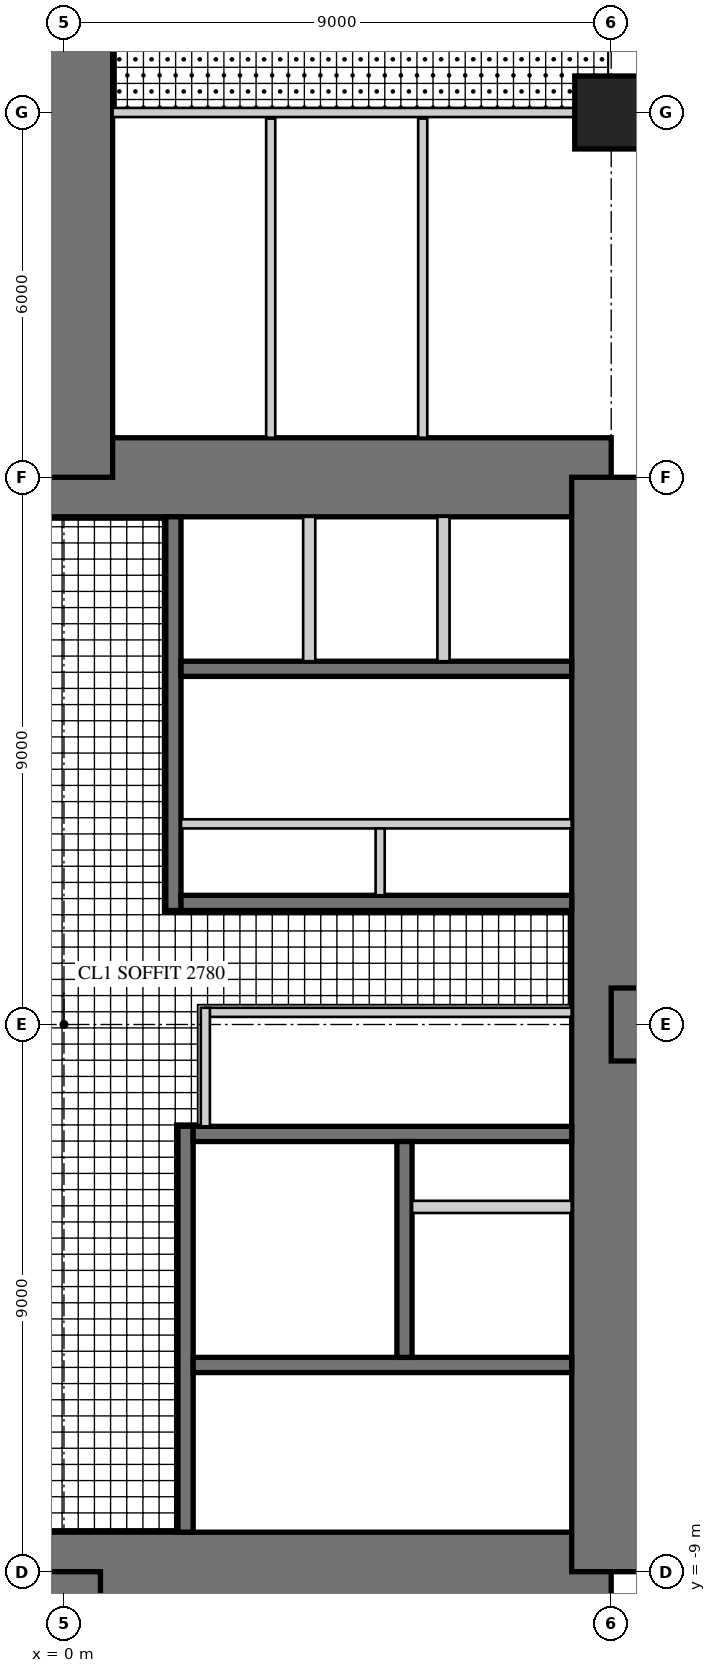
"""IFC4 building model, lengths in metres.
Left out: names, types, materials, properties, quantities, classifications, styles, units other than length and angle.
Written with IfcOpenShell. Run it as: python <this file> out.ifc"""

import sys

from ifc_helpers import new_model, si_unit, direction, frame, frame_2d, origin, origin_2d, place, context, subcontext, project, spatial, rectangle, extrude, element, fill, save


model = new_model("IFC4")
c1 = context("Model", 3, precision=1e-05, world=origin(), true_north=direction((0.0, 1.0)))
c2 = subcontext(c1, "Body", "Model", "MODEL_VIEW")
j1 = project(units=[si_unit("LENGTHUNIT", "METRE"), si_unit("PLANEANGLEUNIT", "RADIAN")], contexts=[c1])
p1 = place(None, origin())
s1 = spatial("IfcSite", under=j1, at=p1, CompositionType="ELEMENT")
p2 = place(p1, origin())
s2 = spatial("IfcBuilding", under=s1, at=p2, CompositionType="ELEMENT")
p3 = place(p2, frame((0.0, 0.0, 79.5)))
s3 = spatial("IfcBuildingStorey", under=s2, at=p3, CompositionType="ELEMENT", Elevation=79.5)
p4 = place(p3, frame((9.0, 9.0, 0.0), z_axis=(0.0, 0.0, 1.0), x_axis=(-1.0, 0.0, 0.0)))
e1 = element("IfcWall", 1, at=p4, inside=s3, PredefinedType="SHEAR", context=c2, shape_type="SweptSolid", body=[
    extrude(rectangle(XDim=18.0, YDim=1.3, at=frame_2d((9.0, 0.0))), origin(), (0.0, 0.0, 1.0), 4.0),
])
p5 = place(p4, frame((9.8, 0.0, 0.0)))
e2 = element("IfcOpeningElement", 2, at=p5, cuts=e1, PredefinedType="OPENING", context=c2, shape_type="SweptSolid", body=[
    extrude(rectangle(XDim=1.0, YDim=2.4, at=frame_2d((0.5, 1.2))), frame((0.0, 0.66, 0.0), z_axis=(0.0, -1.0, 0.0), x_axis=(1.0, 0.0, 0.0)), (0.0, 0.0, 1.0), 1.32),
])
p6 = place(p3, frame((-9.0, -9.0, 0.0), z_axis=(0.0, 0.0, 1.0), x_axis=(1.0, 0.0, 0.0)))
e3 = element("IfcWall", 3, at=p6, inside=s3, PredefinedType="SHEAR", context=c2, shape_type="SweptSolid", body=[
    extrude(rectangle(XDim=18.0, YDim=1.3, at=frame_2d((9.0, 0.0))), origin(), (0.0, 0.0, 1.0), 4.0),
])
p7 = place(p6, frame((9.8, 0.0, 0.0)))
e4 = element("IfcOpeningElement", 4, at=p7, cuts=e3, PredefinedType="OPENING", context=c2, shape_type="SweptSolid", body=[
    extrude(rectangle(XDim=1.0, YDim=2.4, at=frame_2d((0.5, 1.2))), frame((0.0, 0.66, 0.0), z_axis=(0.0, -1.0, 0.0), x_axis=(1.0, 0.0, 0.0)), (0.0, 0.0, 1.0), 1.32),
])
p8 = place(p3, frame((9.0, -9.0, 0.0), z_axis=(0.0, 0.0, 1.0), x_axis=(0.0, 1.0, 0.0)))
e5 = element("IfcWall", 5, at=p8, inside=s3, PredefinedType="SHEAR", context=c2, shape_type="SweptSolid", body=[
    extrude(rectangle(XDim=18.0, YDim=1.3, at=frame_2d((9.0, 0.0))), origin(), (0.0, 0.0, 1.0), 4.0),
])
p9 = place(p8, frame((9.8, 0.0, 0.0)))
e6 = element("IfcOpeningElement", 6, at=p9, cuts=e5, PredefinedType="OPENING", context=c2, shape_type="SweptSolid", body=[
    extrude(rectangle(XDim=1.0, YDim=2.4, at=frame_2d((0.5, 1.2))), frame((0.0, 0.66, 0.0), z_axis=(0.0, -1.0, 0.0), x_axis=(1.0, 0.0, 0.0)), (0.0, 0.0, 1.0), 1.32),
])
p10 = place(p3, frame((1.8, 1.875, 0.0), z_axis=(0.0, 0.0, 1.0), x_axis=(0.0, 1.0, 0.0)))
e7 = element("IfcWall", 7, at=p10, inside=s3, PredefinedType="SHEAR", context=c2, shape_type="SweptSolid", body=[
    extrude(rectangle(XDim=6.475, YDim=0.25, at=frame_2d((3.238, 0.0))), origin(), (0.0, 0.0, 1.0), 4.0),
])
p11 = place(p10, frame((1.875, 0.0, 0.0)))
e8 = element("IfcOpeningElement", 8, at=p11, cuts=e7, PredefinedType="OPENING", context=c2, shape_type="SweptSolid", body=[
    extrude(rectangle(XDim=1.6, YDim=2.4, at=frame_2d((0.8, 1.2))), frame((0.0, 0.135, 0.0), z_axis=(0.0, -1.0, 0.0), x_axis=(1.0, 0.0, 0.0)), (0.0, 0.0, 1.0), 0.27),
])
p12 = place(p3, frame((1.925, 2.0, 0.0), z_axis=(0.0, 0.0, 1.0), x_axis=(1.0, 0.0, 0.0)))
e9 = element("IfcWall", 9, at=p12, inside=s3, PredefinedType="SHEAR", context=c2, shape_type="SweptSolid", body=[
    extrude(rectangle(XDim=6.425, YDim=0.25, at=frame_2d((3.212, 0.0))), origin(), (0.0, 0.0, 1.0), 4.0),
])
p13 = place(p3, frame((1.925, 5.85, 0.0), z_axis=(0.0, 0.0, 1.0), x_axis=(1.0, 0.0, 0.0)))
e10 = element("IfcWall", 10, at=p13, inside=s3, PredefinedType="SHEAR", context=c2, shape_type="SweptSolid", body=[
    extrude(rectangle(XDim=6.425, YDim=0.25, at=frame_2d((3.212, 0.0))), origin(), (0.0, 0.0, 1.0), 4.0),
])
p14 = place(p13, frame((0.454, 0.0, 0.0)))
e11 = element("IfcOpeningElement", 11, at=p14, cuts=e10, PredefinedType="OPENING", context=c2, shape_type="SweptSolid", body=[
    extrude(rectangle(XDim=1.1, YDim=2.2, at=frame_2d((0.55, 1.1))), frame((0.0, 0.135, 0.0), z_axis=(0.0, -1.0, 0.0), x_axis=(1.0, 0.0, 0.0)), (0.0, 0.0, 1.0), 0.27),
])
p15 = place(p13, frame((2.663, 0.0, 0.0)))
e12 = element("IfcOpeningElement", 12, at=p15, cuts=e10, PredefinedType="OPENING", context=c2, shape_type="SweptSolid", body=[
    extrude(rectangle(XDim=1.1, YDim=2.2, at=frame_2d((0.55, 1.1))), frame((0.0, 0.135, 0.0), z_axis=(0.0, -1.0, 0.0), x_axis=(1.0, 0.0, 0.0)), (0.0, 0.0, 1.0), 0.27),
])
p16 = place(p13, frame((4.871, 0.0, 0.0)))
e13 = element("IfcOpeningElement", 13, at=p16, cuts=e10, PredefinedType="OPENING", context=c2, shape_type="SweptSolid", body=[
    extrude(rectangle(XDim=1.1, YDim=2.2, at=frame_2d((0.55, 1.1))), frame((0.0, 0.135, 0.0), z_axis=(0.0, -1.0, 0.0), x_axis=(1.0, 0.0, 0.0)), (0.0, 0.0, 1.0), 0.27),
])
p17 = place(p3, frame((1.925, 3.3, 0.0), z_axis=(0.0, 0.0, 1.0), x_axis=(1.0, 0.0, 0.0)))
e14 = element("IfcWall", 14, at=p17, inside=s3, PredefinedType="PARTITIONING", context=c2, shape_type="SweptSolid", body=[
    extrude(rectangle(XDim=6.425, YDim=0.15, at=frame_2d((3.212, 0.0))), origin(), (0.0, 0.0, 1.0), 4.0),
])
p18 = place(p17, frame((0.075, 0.0, 0.0)))
e15 = element("IfcOpeningElement", 15, at=p18, cuts=e14, PredefinedType="OPENING", context=c2, shape_type="SweptSolid", body=[
    extrude(rectangle(XDim=0.8, YDim=2.1, at=frame_2d((0.4, 1.05))), frame((0.0, 0.085, 0.0), z_axis=(0.0, -1.0, 0.0), x_axis=(1.0, 0.0, 0.0)), (0.0, 0.0, 1.0), 0.17),
])
p19 = place(p17, frame((3.675, 0.0, 0.0)))
e16 = element("IfcOpeningElement", 16, at=p19, cuts=e14, PredefinedType="OPENING", context=c2, shape_type="SweptSolid", body=[
    extrude(rectangle(XDim=0.8, YDim=2.1, at=frame_2d((0.4, 1.05))), frame((0.0, 0.085, 0.0), z_axis=(0.0, -1.0, 0.0), x_axis=(1.0, 0.0, 0.0)), (0.0, 0.0, 1.0), 0.17),
])
p20 = place(p3, frame((5.2, 2.125, 0.0), z_axis=(0.0, 0.0, 1.0), x_axis=(0.0, 1.0, 0.0)))
e17 = element("IfcWall", 17, at=p20, inside=s3, PredefinedType="PARTITIONING", context=c2, shape_type="SweptSolid", body=[
    extrude(rectangle(XDim=1.1, YDim=0.15, at=frame_2d((0.55, 0.0))), origin(), (0.0, 0.0, 1.0), 4.0),
])
for number, where, z_axis, x_axis in (
    (18, (4.033, 5.975, 0.0), (0.0, 0.0, 1.0), (0.0, 1.0, 0.0)),
    (19, (6.242, 5.975, 0.0), (0.0, 0.0, 1.0), (0.0, 1.0, 0.0)),
):
    element("IfcWall", number, at=place(p3, frame(where, z_axis=z_axis, x_axis=x_axis)), inside=s3, PredefinedType="PARTITIONING", context=c2, shape_type="SweptSolid", body=[
        extrude(rectangle(XDim=2.375, YDim=0.2, at=frame_2d((1.188, 0.0))), origin(), (0.0, 0.0, 1.0), 4.0),
    ])
p21 = place(p3, frame((2.0, -1.675, 0.0), z_axis=(0.0, 0.0, 1.0), x_axis=(0.0, -1.0, 0.0)))
e20 = element("IfcWall", 20, at=p21, inside=s3, PredefinedType="SHEAR", context=c2, shape_type="SweptSolid", body=[
    extrude(rectangle(XDim=6.675, YDim=0.25, at=frame_2d((3.337, 0.0))), origin(), (0.0, 0.0, 1.0), 4.0),
])
p22 = place(p21, frame((0.725, 0.0, 0.0)))
e21 = element("IfcOpeningElement", 21, at=p22, cuts=e20, PredefinedType="OPENING", context=c2, shape_type="SweptSolid", body=[
    extrude(rectangle(XDim=1.0, YDim=2.1, at=frame_2d((0.5, 1.05))), frame((0.0, 0.135, 0.0), z_axis=(0.0, -1.0, 0.0), x_axis=(1.0, 0.0, 0.0)), (0.0, 0.0, 1.0), 0.27),
])
p23 = place(p3, frame((2.125, -1.8, 0.0), z_axis=(0.0, 0.0, 1.0), x_axis=(1.0, 0.0, 0.0)))
e22 = element("IfcWall", 22, at=p23, inside=s3, PredefinedType="SHEAR", context=c2, shape_type="SweptSolid", body=[
    extrude(rectangle(XDim=6.225, YDim=0.25, at=frame_2d((3.113, 0.0))), origin(), (0.0, 0.0, 1.0), 4.0),
])
p24 = place(p3, frame((2.125, -5.6, 0.0), z_axis=(0.0, 0.0, 1.0), x_axis=(1.0, 0.0, 0.0)))
e23 = element("IfcWall", 23, at=p24, inside=s3, PredefinedType="SHEAR", context=c2, shape_type="SweptSolid", body=[
    extrude(rectangle(XDim=6.225, YDim=0.25, at=frame_2d((3.113, 0.0))), origin(), (0.0, 0.0, 1.0), 4.0),
])
p25 = place(p24, frame((0.175, 0.0, 0.0)))
e24 = element("IfcOpeningElement", 24, at=p25, cuts=e23, PredefinedType="OPENING", context=c2, shape_type="SweptSolid", body=[
    extrude(rectangle(XDim=1.0, YDim=2.1, at=frame_2d((0.5, 1.05))), frame((0.0, 0.135, 0.0), z_axis=(0.0, -1.0, 0.0), x_axis=(1.0, 0.0, 0.0)), (0.0, 0.0, 1.0), 0.27),
])
p26 = place(p3, frame((5.6, -1.925, 0.0), z_axis=(0.0, 0.0, 1.0), x_axis=(0.0, -1.0, 0.0)))
e25 = element("IfcWall", 25, at=p26, inside=s3, PredefinedType="SHEAR", context=c2, shape_type="SweptSolid", body=[
    extrude(rectangle(XDim=3.55, YDim=0.25, at=frame_2d((1.775, 0.0))), origin(), (0.0, 0.0, 1.0), 4.0),
])
p27 = place(p26, frame((1.525, 0.0, 0.0)))
e26 = element("IfcOpeningElement", 26, at=p27, cuts=e25, PredefinedType="OPENING", context=c2, shape_type="SweptSolid", body=[
    extrude(rectangle(XDim=1.1, YDim=2.2, at=frame_2d((0.55, 1.1))), frame((0.0, 0.135, 0.0), z_axis=(0.0, -1.0, 0.0), x_axis=(1.0, 0.0, 0.0)), (0.0, 0.0, 1.0), 0.27),
])
p28 = place(p26, frame((0.075, 0.0, 0.0)))
e27 = element("IfcOpeningElement", 27, at=p28, cuts=e25, PredefinedType="OPENING", context=c2, shape_type="SweptSolid", body=[
    extrude(rectangle(XDim=0.8, YDim=2.1, at=frame_2d((0.4, 1.05))), frame((0.0, 0.135, 0.0), z_axis=(0.0, -1.0, 0.0), x_axis=(1.0, 0.0, 0.0)), (0.0, 0.0, 1.0), 0.27),
])
p29 = place(p3, frame((5.725, -3.0, 0.0), z_axis=(0.0, 0.0, 1.0), x_axis=(1.0, 0.0, 0.0)))
e28 = element("IfcWall", 28, at=p29, inside=s3, PredefinedType="PARTITIONING", context=c2, shape_type="SweptSolid", body=[
    extrude(rectangle(XDim=2.625, YDim=0.2, at=frame_2d((1.312, 0.0))), origin(), (0.0, 0.0, 1.0), 4.0),
])
p30 = place(p3, frame((0.0, 9.0, 0.0), z_axis=(0.0, 0.0, 1.0), x_axis=(0.0, 1.0, 0.0)))
e29 = element("IfcWall", 29, at=p30, inside=s3, PredefinedType="SHEAR", context=c2, shape_type="SweptSolid", body=[
    extrude(rectangle(XDim=9.0, YDim=1.6, at=frame_2d((4.5, 0.0))), origin(), (0.0, 0.0, 1.0), 4.0),
])
p31 = place(p3, frame((9.0, 0.0, 0.0), z_axis=(0.0, 0.0, 1.0), x_axis=(1.0, 0.0, 0.0)))
e30 = element("IfcWall", 30, at=p31, inside=s3, PredefinedType="SHEAR", context=c2, shape_type="SweptSolid", body=[
    extrude(rectangle(XDim=18.0, YDim=1.2, at=frame_2d((9.0, 0.0))), origin(), (0.0, 0.0, 1.0), 4.0),
])
p32 = place(p31, frame((9.9, 0.0, 0.0)))
e31 = element("IfcOpeningElement", 31, at=p32, cuts=e30, PredefinedType="OPENING", context=c2, shape_type="SweptSolid", body=[
    extrude(rectangle(XDim=1.0, YDim=2.2, at=frame_2d((0.5, 1.1))), frame((0.0, 0.61, 0.0), z_axis=(0.0, -1.0, 0.0), x_axis=(1.0, 0.0, 0.0)), (0.0, 0.0, 1.0), 1.22),
])
p33 = place(p3, frame((0.0, -9.0, 0.0), z_axis=(0.0, 0.0, 1.0), x_axis=(0.0, -1.0, 0.0)))
e32 = element("IfcWall", 32, at=p33, inside=s3, PredefinedType="SHEAR", context=c2, shape_type="SweptSolid", body=[
    extrude(rectangle(XDim=18.0, YDim=1.2, at=frame_2d((9.0, 0.0))), origin(), (0.0, 0.0, 1.0), 4.0),
])
p34 = place(p33, frame((9.9, 0.0, 0.0)))
e33 = element("IfcOpeningElement", 33, at=p34, cuts=e32, PredefinedType="OPENING", context=c2, shape_type="SweptSolid", body=[
    extrude(rectangle(XDim=1.0, YDim=2.2, at=frame_2d((0.5, 1.1))), frame((0.0, 0.61, 0.0), z_axis=(0.0, -1.0, 0.0), x_axis=(1.0, 0.0, 0.0)), (0.0, 0.0, 1.0), 1.22),
])
p35 = place(p3, frame((9.0, 15.0, 0.0), z_axis=(0.0, 0.0, 1.0), x_axis=(1.0, 0.0, 0.0)))
e34 = element("IfcColumn", 34, at=p35, inside=s3, PredefinedType="COLUMN", context=c2, shape_type="SweptSolid", body=[
    extrude(rectangle(XDim=1.2, YDim=1.2, at=origin_2d()), origin(), (0.0, 0.0, 1.0), 4.0),
])
p36 = place(p3, frame((2.325, 0.2, 0.0), z_axis=(0.0, 0.0, 1.0), x_axis=(1.0, 0.0, 0.0)))
e35 = element("IfcWall", 35, at=p36, inside=s3, PredefinedType="PARTITIONING", context=c2, shape_type="SweptSolid", body=[
    extrude(rectangle(XDim=6.025, YDim=0.15, at=frame_2d((3.013, 0.0))), origin(), (0.0, 0.0, 1.0), 3.8),
])
p37 = place(p36, frame((0.4, 0.0, 0.0)))
e36 = element("IfcOpeningElement", 36, at=p37, cuts=e35, PredefinedType="OPENING", context=c2, shape_type="SweptSolid", body=[
    extrude(rectangle(XDim=1.0, YDim=2.1, at=frame_2d((0.5, 1.05))), frame((0.0, 0.085, 0.0), z_axis=(0.0, -1.0, 0.0), x_axis=(1.0, 0.0, 0.0)), (0.0, 0.0, 1.0), 0.17),
])
p38 = place(p3, frame((2.325, -1.675, 0.0), z_axis=(0.0, 0.0, 1.0), x_axis=(0.0, 1.0, 0.0)))
e37 = element("IfcWall", 37, at=p38, inside=s3, PredefinedType="PARTITIONING", context=c2, shape_type="SweptSolid", body=[
    extrude(rectangle(XDim=1.95, YDim=0.15, at=frame_2d((0.975, 0.0))), origin(), (0.0, 0.0, 1.0), 3.8),
])
p39 = place(p3, frame((8.4, 15.0, 0.0), z_axis=(0.0, 0.0, 1.0), x_axis=(-1.0, 0.0, 0.0)))
e38 = element("IfcWall", 38, at=p39, inside=s3, PredefinedType="PARTITIONING", context=c2, shape_type="SweptSolid", body=[
    extrude(rectangle(XDim=7.6, YDim=0.15, at=frame_2d((3.8, 0.0))), origin(), (0.0, 0.0, 1.0), 2.95),
])
p40 = place(p39, frame((0.75, 0.0, 0.0)))
e39 = element("IfcOpeningElement", 39, at=p40, cuts=e38, PredefinedType="OPENING", context=c2, shape_type="SweptSolid", body=[
    extrude(rectangle(XDim=1.0, YDim=2.1, at=frame_2d((0.5, 1.05))), frame((0.0, 0.085, 0.0), z_axis=(0.0, -1.0, 0.0), x_axis=(1.0, 0.0, 0.0)), (0.0, 0.0, 1.0), 0.17),
])
p41 = place(p39, frame((3.25, 0.0, 0.0)))
e40 = element("IfcOpeningElement", 40, at=p41, cuts=e38, PredefinedType="OPENING", context=c2, shape_type="SweptSolid", body=[
    extrude(rectangle(XDim=1.0, YDim=2.1, at=frame_2d((0.5, 1.05))), frame((0.0, 0.085, 0.0), z_axis=(0.0, -1.0, 0.0), x_axis=(1.0, 0.0, 0.0)), (0.0, 0.0, 1.0), 0.17),
])
p42 = place(p39, frame((5.8, 0.0, 0.0)))
e41 = element("IfcOpeningElement", 41, at=p42, cuts=e38, PredefinedType="OPENING", context=c2, shape_type="SweptSolid", body=[
    extrude(rectangle(XDim=1.0, YDim=2.1, at=frame_2d((0.5, 1.05))), frame((0.0, 0.085, 0.0), z_axis=(0.0, -1.0, 0.0), x_axis=(1.0, 0.0, 0.0)), (0.0, 0.0, 1.0), 0.17),
])
p43 = place(p3, frame((3.4, 9.65, 0.0), z_axis=(0.0, 0.0, 1.0), x_axis=(0.0, 1.0, 0.0)))
e42 = element("IfcWall", 42, at=p43, inside=s3, PredefinedType="PARTITIONING", context=c2, shape_type="SweptSolid", body=[
    extrude(rectangle(XDim=5.25, YDim=0.15, at=frame_2d((2.625, 0.0))), origin(), (0.0, 0.0, 1.0), 3.8),
])
p44 = place(p3, frame((5.9, 9.65, 0.0), z_axis=(0.0, 0.0, 1.0), x_axis=(0.0, 1.0, 0.0)))
e43 = element("IfcWall", 43, at=p44, inside=s3, PredefinedType="PARTITIONING", context=c2, shape_type="SweptSolid", body=[
    extrude(rectangle(XDim=5.25, YDim=0.15, at=frame_2d((2.625, 0.0))), origin(), (0.0, 0.0, 1.0), 3.0),
])
p45 = place(p37, frame((1.0, 0.0, 0.0), z_axis=(0.0, 0.0, 1.0), x_axis=(-1.0, 0.0, 0.0)))
e44 = element("IfcDoor", 44, at=p45, inside=s3, OperationType="SINGLE_SWING_RIGHT", PredefinedType="DOOR", context=c2, shape_type="SweptSolid", body=[
    extrude(rectangle(XDim=1.0, YDim=2.1, at=frame_2d((0.5, 1.05))), frame((0.0, 0.025, 0.0), z_axis=(0.0, -1.0, 0.0), x_axis=(1.0, 0.0, 0.0)), (0.0, 0.0, 1.0), 0.05),
])
fill(e36, e44)
p46 = place(p40, origin())
e45 = element("IfcDoor", 45, at=p46, inside=s3, OperationType="SINGLE_SWING_RIGHT", PredefinedType="DOOR", context=c2, shape_type="SweptSolid", body=[
    extrude(rectangle(XDim=1.0, YDim=2.1, at=frame_2d((0.5, 1.05))), frame((0.0, 0.025, 0.0), z_axis=(0.0, -1.0, 0.0), x_axis=(1.0, 0.0, 0.0)), (0.0, 0.0, 1.0), 0.05),
])
fill(e39, e45)
p47 = place(p41, origin())
e46 = element("IfcDoor", 46, at=p47, inside=s3, OperationType="SINGLE_SWING_LEFT", PredefinedType="DOOR", context=c2, shape_type="SweptSolid", body=[
    extrude(rectangle(XDim=1.0, YDim=2.1, at=frame_2d((0.5, 1.05))), frame((0.0, 0.025, 0.0), z_axis=(0.0, -1.0, 0.0), x_axis=(1.0, 0.0, 0.0)), (0.0, 0.0, 1.0), 0.05),
])
fill(e40, e46)
p48 = place(p42, origin())
e47 = element("IfcDoor", 47, at=p48, inside=s3, OperationType="SINGLE_SWING_LEFT", PredefinedType="DOOR", context=c2, shape_type="SweptSolid", body=[
    extrude(rectangle(XDim=1.0, YDim=2.1, at=frame_2d((0.5, 1.05))), frame((0.0, 0.025, 0.0), z_axis=(0.0, -1.0, 0.0), x_axis=(1.0, 0.0, 0.0)), (0.0, 0.0, 1.0), 0.05),
])
fill(e41, e47)
p49 = place(p7, frame((1.0, 0.0, 0.0), z_axis=(0.0, 0.0, 1.0), x_axis=(-1.0, 0.0, 0.0)))
e48 = element("IfcDoor", 48, at=p49, inside=s3, OperationType="SINGLE_SWING_RIGHT", PredefinedType="DOOR", context=c2, shape_type="SweptSolid", body=[
    extrude(rectangle(XDim=1.0, YDim=2.4, at=frame_2d((0.5, 1.2))), frame((0.0, -0.005, 0.0), z_axis=(0.0, -1.0, 0.0), x_axis=(1.0, 0.0, 0.0)), (0.0, 0.0, 1.0), 0.05),
])
fill(e4, e48)
p50 = place(p9, frame((1.0, 0.0, 0.0), z_axis=(0.0, 0.0, 1.0), x_axis=(-1.0, 0.0, 0.0)))
e49 = element("IfcDoor", 49, at=p50, inside=s3, OperationType="SINGLE_SWING_RIGHT", PredefinedType="DOOR", context=c2, shape_type="SweptSolid", body=[
    extrude(rectangle(XDim=1.0, YDim=2.4, at=frame_2d((0.5, 1.2))), frame((0.0, -0.005, 0.0), z_axis=(0.0, -1.0, 0.0), x_axis=(1.0, 0.0, 0.0)), (0.0, 0.0, 1.0), 0.05),
])
fill(e6, e49)
p51 = place(p14, origin())
e50 = element("IfcDoor", 50, at=p51, inside=s3, OperationType="DOUBLE_DOOR_SLIDING", PredefinedType="DOOR", context=c2, shape_type="SweptSolid", body=[
    extrude(rectangle(XDim=1.1, YDim=2.2, at=frame_2d((0.55, 1.1))), frame((0.0, 0.025, 0.0), z_axis=(0.0, -1.0, 0.0), x_axis=(1.0, 0.0, 0.0)), (0.0, 0.0, 1.0), 0.05),
])
fill(e11, e50)
p52 = place(p15, origin())
e51 = element("IfcDoor", 51, at=p52, inside=s3, OperationType="DOUBLE_DOOR_SLIDING", PredefinedType="DOOR", context=c2, shape_type="SweptSolid", body=[
    extrude(rectangle(XDim=1.1, YDim=2.2, at=frame_2d((0.55, 1.1))), frame((0.0, 0.025, 0.0), z_axis=(0.0, -1.0, 0.0), x_axis=(1.0, 0.0, 0.0)), (0.0, 0.0, 1.0), 0.05),
])
fill(e12, e51)
p53 = place(p16, origin())
e52 = element("IfcDoor", 52, at=p53, inside=s3, OperationType="DOUBLE_DOOR_SLIDING", PredefinedType="DOOR", context=c2, shape_type="SweptSolid", body=[
    extrude(rectangle(XDim=1.1, YDim=2.2, at=frame_2d((0.55, 1.1))), frame((0.0, 0.025, 0.0), z_axis=(0.0, -1.0, 0.0), x_axis=(1.0, 0.0, 0.0)), (0.0, 0.0, 1.0), 0.05),
])
fill(e13, e52)
p54 = place(p11, origin())
e53 = element("IfcDoor", 53, at=p54, inside=s3, OperationType="DOUBLE_DOOR_DOUBLE_SWING", PredefinedType="DOOR", context=c2, shape_type="SweptSolid", body=[
    extrude(rectangle(XDim=1.6, YDim=2.4, at=frame_2d((0.8, 1.2))), frame((0.0, 0.025, 0.0), z_axis=(0.0, -1.0, 0.0), x_axis=(1.0, 0.0, 0.0)), (0.0, 0.0, 1.0), 0.05),
])
fill(e8, e53)
p55 = place(p18, frame((0.8, 0.0, 0.0), z_axis=(0.0, 0.0, 1.0), x_axis=(-1.0, 0.0, 0.0)))
e54 = element("IfcDoor", 54, at=p55, inside=s3, OperationType="SINGLE_SWING_RIGHT", PredefinedType="DOOR", context=c2, shape_type="SweptSolid", body=[
    extrude(rectangle(XDim=0.8, YDim=2.1, at=frame_2d((0.4, 1.05))), frame((0.0, 0.025, 0.0), z_axis=(0.0, -1.0, 0.0), x_axis=(1.0, 0.0, 0.0)), (0.0, 0.0, 1.0), 0.05),
])
fill(e15, e54)
p56 = place(p19, frame((0.8, 0.0, 0.0), z_axis=(0.0, 0.0, 1.0), x_axis=(-1.0, 0.0, 0.0)))
e55 = element("IfcDoor", 55, at=p56, inside=s3, OperationType="SINGLE_SWING_RIGHT", PredefinedType="DOOR", context=c2, shape_type="SweptSolid", body=[
    extrude(rectangle(XDim=0.8, YDim=2.1, at=frame_2d((0.4, 1.05))), frame((0.0, 0.025, 0.0), z_axis=(0.0, -1.0, 0.0), x_axis=(1.0, 0.0, 0.0)), (0.0, 0.0, 1.0), 0.05),
])
fill(e16, e55)
p57 = place(p22, origin())
e56 = element("IfcDoor", 56, at=p57, inside=s3, OperationType="SINGLE_SWING_LEFT", PredefinedType="DOOR", context=c2, shape_type="SweptSolid", body=[
    extrude(rectangle(XDim=1.0, YDim=2.1, at=frame_2d((0.5, 1.05))), frame((0.0, 0.025, 0.0), z_axis=(0.0, -1.0, 0.0), x_axis=(1.0, 0.0, 0.0)), (0.0, 0.0, 1.0), 0.05),
])
fill(e21, e56)
p58 = place(p25, frame((1.0, 0.0, 0.0), z_axis=(0.0, 0.0, 1.0), x_axis=(-1.0, 0.0, 0.0)))
e57 = element("IfcDoor", 57, at=p58, inside=s3, OperationType="SINGLE_SWING_RIGHT", PredefinedType="DOOR", context=c2, shape_type="SweptSolid", body=[
    extrude(rectangle(XDim=1.0, YDim=2.1, at=frame_2d((0.5, 1.05))), frame((0.0, 0.025, 0.0), z_axis=(0.0, -1.0, 0.0), x_axis=(1.0, 0.0, 0.0)), (0.0, 0.0, 1.0), 0.05),
])
fill(e24, e57)
p59 = place(p27, origin())
e58 = element("IfcDoor", 58, at=p59, inside=s3, OperationType="DOUBLE_DOOR_SLIDING", PredefinedType="DOOR", context=c2, shape_type="SweptSolid", body=[
    extrude(rectangle(XDim=1.1, YDim=2.2, at=frame_2d((0.55, 1.1))), frame((0.0, 0.025, 0.0), z_axis=(0.0, -1.0, 0.0), x_axis=(1.0, 0.0, 0.0)), (0.0, 0.0, 1.0), 0.05),
])
fill(e26, e58)
p60 = place(p28, origin())
e59 = element("IfcDoor", 59, at=p60, inside=s3, OperationType="SINGLE_SWING_LEFT", PredefinedType="DOOR", context=c2, shape_type="SweptSolid", body=[
    extrude(rectangle(XDim=0.8, YDim=2.1, at=frame_2d((0.4, 1.05))), frame((0.0, 0.025, 0.0), z_axis=(0.0, -1.0, 0.0), x_axis=(1.0, 0.0, 0.0)), (0.0, 0.0, 1.0), 0.05),
])
fill(e27, e59)
save(model, sys.argv[1])
